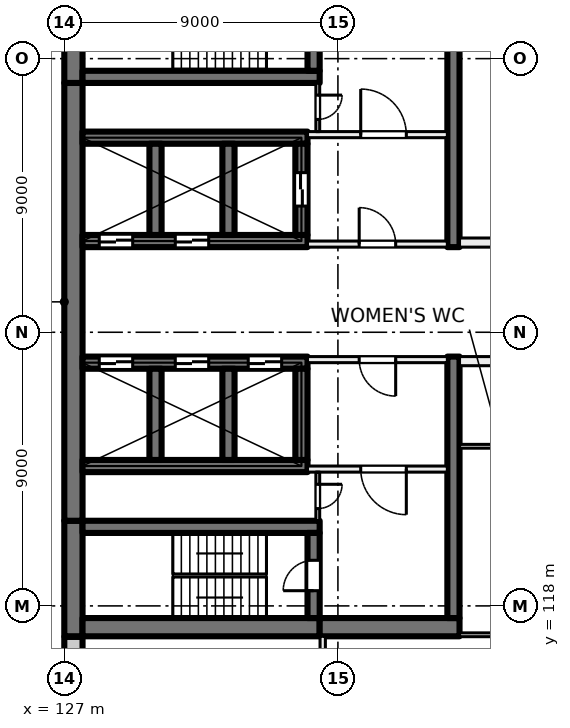
"""IFC4 building model, lengths in metres.
Left out: names, types, materials, properties, quantities, classifications, styles, units other than length and angle.
Written with IfcOpenShell. Run it as: python <this file> out.ifc"""

import sys

from ifc_helpers import new_model, si_unit, direction, frame, frame_2d, origin, place, context, subcontext, project, spatial, rectangle, extrude, element, fill, save


model = new_model("IFC4")
c1 = context("Model", 3, precision=1e-05, world=origin(), true_north=direction((0.0, 1.0)))
c2 = subcontext(c1, "Body", "Model", "MODEL_VIEW")
j1 = project(units=[si_unit("LENGTHUNIT", "METRE"), si_unit("PLANEANGLEUNIT", "RADIAN")], contexts=[c1])
p1 = place(None, origin())
s1 = spatial("IfcSite", under=j1, at=p1, CompositionType="ELEMENT")
p2 = place(p1, origin())
s2 = spatial("IfcBuilding", under=s1, at=p2, CompositionType="ELEMENT")
p3 = place(p2, frame((0.0, 0.0, 43.5)))
s3 = spatial("IfcBuildingStorey", under=s2, at=p3, CompositionType="ELEMENT", Elevation=43.5)
p4 = place(p3, frame((127.3, 117.0, 0.0), z_axis=(0.0, 0.0, 1.0), x_axis=(0.0, 1.0, 0.0)))
e1 = element("IfcWall", 1, at=p4, inside=s3, PredefinedType="SHEAR", context=c2, shape_type="SweptSolid", body=[
    extrude(rectangle(XDim=3.8, YDim=0.6, at=frame_2d((1.9, 0.0))), origin(), (0.0, 0.0, 1.0), 4.0),
])
p5 = place(p3, frame((127.3, 120.8, 0.0), z_axis=(0.0, 0.0, 1.0), x_axis=(0.0, 1.0, 0.0)))
e2 = element("IfcWall", 2, at=p5, inside=s3, PredefinedType="SHEAR", context=c2, shape_type="SweptSolid", body=[
    extrude(rectangle(XDim=14.4, YDim=0.6, at=frame_2d((7.2, 0.0))), origin(), (0.0, 0.0, 1.0), 4.0),
])
p6 = place(p3, frame((127.3, 135.2, 0.0), z_axis=(0.0, 0.0, 1.0), x_axis=(0.0, 1.0, 0.0)))
e3 = element("IfcWall", 3, at=p6, inside=s3, PredefinedType="SHEAR", context=c2, shape_type="SweptSolid", body=[
    extrude(rectangle(XDim=3.8, YDim=0.6, at=frame_2d((1.9, 0.0))), origin(), (0.0, 0.0, 1.0), 4.0),
])
p7 = place(p3, frame((127.6, 117.3, 0.0), z_axis=(0.0, 0.0, 1.0), x_axis=(1.0, 0.0, 0.0)))
e4 = element("IfcWall", 4, at=p7, inside=s3, PredefinedType="SHEAR", context=c2, shape_type="SweptSolid", body=[
    extrude(rectangle(XDim=7.8, YDim=0.6, at=frame_2d((3.9, 0.0))), origin(), (0.0, 0.0, 1.0), 4.0),
])
p8 = place(p3, frame((135.4, 117.3, 0.0), z_axis=(0.0, 0.0, 1.0), x_axis=(1.0, 0.0, 0.0)))
e5 = element("IfcWall", 5, at=p8, inside=s3, PredefinedType="SHEAR", context=c2, shape_type="SweptSolid", body=[
    extrude(rectangle(XDim=4.6, YDim=0.6, at=frame_2d((2.3, 0.0))), origin(), (0.0, 0.0, 1.0), 4.0),
])
p9 = place(p3, frame((127.6, 120.6, 0.0), z_axis=(0.0, 0.0, 1.0), x_axis=(1.0, 0.0, 0.0)))
e6 = element("IfcWall", 6, at=p9, inside=s3, PredefinedType="SHEAR", context=c2, shape_type="SweptSolid", body=[
    extrude(rectangle(XDim=7.8, YDim=0.4, at=frame_2d((3.9, 0.0))), origin(), (0.0, 0.0, 1.0), 4.0),
])
p10 = place(p3, frame((135.2, 117.6, 0.0), z_axis=(0.0, 0.0, 1.0), x_axis=(0.0, 1.0, 0.0)))
e7 = element("IfcWall", 7, at=p10, inside=s3, PredefinedType="SHEAR", context=c2, shape_type="SweptSolid", body=[
    extrude(rectangle(XDim=2.8, YDim=0.4, at=frame_2d((1.4, 0.0))), origin(), (0.0, 0.0, 1.0), 4.0),
])
p11 = place(p10, frame((0.9, 0.0, 0.0)))
e8 = element("IfcOpeningElement", 8, at=p11, cuts=e7, PredefinedType="OPENING", context=c2, shape_type="SweptSolid", body=[
    extrude(rectangle(XDim=1.0, YDim=2.1, at=frame_2d((0.5, 1.05))), frame((0.0, 0.21, 0.0), z_axis=(0.0, -1.0, 0.0), x_axis=(1.0, 0.0, 0.0)), (0.0, 0.0, 1.0), 0.42),
])
p12 = place(p3, frame((127.6, 135.4, 0.0), z_axis=(0.0, 0.0, 1.0), x_axis=(1.0, 0.0, 0.0)))
e9 = element("IfcWall", 9, at=p12, inside=s3, PredefinedType="SHEAR", context=c2, shape_type="SweptSolid", body=[
    extrude(rectangle(XDim=7.8, YDim=0.4, at=frame_2d((3.9, 0.0))), origin(), (0.0, 0.0, 1.0), 4.0),
])
p13 = place(p3, frame((135.2, 135.6, 0.0), z_axis=(0.0, 0.0, 1.0), x_axis=(0.0, 1.0, 0.0)))
e10 = element("IfcWall", 10, at=p13, inside=s3, PredefinedType="SHEAR", context=c2, shape_type="SweptSolid", body=[
    extrude(rectangle(XDim=2.8, YDim=0.4, at=frame_2d((1.4, 0.0))), origin(), (0.0, 0.0, 1.0), 4.0),
])
p14 = place(p13, frame((0.9, 0.0, 0.0)))
e11 = element("IfcOpeningElement", 11, at=p14, cuts=e10, PredefinedType="OPENING", context=c2, shape_type="SweptSolid", body=[
    extrude(rectangle(XDim=1.0, YDim=2.1, at=frame_2d((0.5, 1.05))), frame((0.0, 0.21, 0.0), z_axis=(0.0, -1.0, 0.0), x_axis=(1.0, 0.0, 0.0)), (0.0, 0.0, 1.0), 0.42),
])
p15 = place(p3, frame((127.6, 126.0, 0.0), z_axis=(0.0, 0.0, 1.0), x_axis=(1.0, 0.0, 0.0)))
e12 = element("IfcWall", 12, at=p15, inside=s3, PredefinedType="SHEAR", context=c2, shape_type="SweptSolid", body=[
    extrude(rectangle(XDim=7.4, YDim=0.4, at=frame_2d((3.7, 0.0))), origin(), (0.0, 0.0, 1.0), 4.0),
])
p16 = place(p15, frame((0.55, 0.0, 0.0)))
e13 = element("IfcOpeningElement", 13, at=p16, cuts=e12, PredefinedType="OPENING", context=c2, shape_type="SweptSolid", body=[
    extrude(rectangle(XDim=1.1, YDim=2.1, at=frame_2d((0.55, 1.05))), frame((0.0, 0.21, 0.0), z_axis=(0.0, -1.0, 0.0), x_axis=(1.0, 0.0, 0.0)), (0.0, 0.0, 1.0), 0.42),
])
p17 = place(p15, frame((3.05, 0.0, 0.0)))
e14 = element("IfcOpeningElement", 14, at=p17, cuts=e12, PredefinedType="OPENING", context=c2, shape_type="SweptSolid", body=[
    extrude(rectangle(XDim=1.1, YDim=2.1, at=frame_2d((0.55, 1.05))), frame((0.0, 0.21, 0.0), z_axis=(0.0, -1.0, 0.0), x_axis=(1.0, 0.0, 0.0)), (0.0, 0.0, 1.0), 0.42),
])
p18 = place(p15, frame((5.45, 0.0, 0.0)))
e15 = element("IfcOpeningElement", 15, at=p18, cuts=e12, PredefinedType="OPENING", context=c2, shape_type="SweptSolid", body=[
    extrude(rectangle(XDim=1.1, YDim=2.1, at=frame_2d((0.55, 1.05))), frame((0.0, 0.21, 0.0), z_axis=(0.0, -1.0, 0.0), x_axis=(1.0, 0.0, 0.0)), (0.0, 0.0, 1.0), 0.42),
])
p19 = place(p3, frame((127.6, 122.6, 0.0), z_axis=(0.0, 0.0, 1.0), x_axis=(1.0, 0.0, 0.0)))
e16 = element("IfcWall", 16, at=p19, inside=s3, PredefinedType="SHEAR", context=c2, shape_type="SweptSolid", body=[
    extrude(rectangle(XDim=7.4, YDim=0.4, at=frame_2d((3.7, 0.0))), origin(), (0.0, 0.0, 1.0), 4.0),
])
for number, where, z_axis, x_axis in (
    (17, (130.0, 122.8, 0.0), (0.0, 0.0, 1.0), (0.0, 1.0, 0.0)),
    (18, (132.4, 122.8, 0.0), (0.0, 0.0, 1.0), (0.0, 1.0, 0.0)),
    (19, (134.8, 122.8, 0.0), (0.0, 0.0, 1.0), (0.0, 1.0, 0.0)),
):
    element("IfcWall", number, at=place(p3, frame(where, z_axis=z_axis, x_axis=x_axis)), inside=s3, PredefinedType="SHEAR", context=c2, shape_type="SweptSolid", body=[
        extrude(rectangle(XDim=3.0, YDim=0.4, at=frame_2d((1.5, 0.0))), origin(), (0.0, 0.0, 1.0), 4.0),
    ])
p20 = place(p3, frame((127.6, 130.0, 0.0), z_axis=(0.0, 0.0, 1.0), x_axis=(1.0, 0.0, 0.0)))
e20 = element("IfcWall", 20, at=p20, inside=s3, PredefinedType="SHEAR", context=c2, shape_type="SweptSolid", body=[
    extrude(rectangle(XDim=7.4, YDim=0.4, at=frame_2d((3.7, 0.0))), origin(), (0.0, 0.0, 1.0), 4.0),
])
p21 = place(p20, frame((0.55, 0.0, 0.0)))
e21 = element("IfcOpeningElement", 21, at=p21, cuts=e20, PredefinedType="OPENING", context=c2, shape_type="SweptSolid", body=[
    extrude(rectangle(XDim=1.1, YDim=2.1, at=frame_2d((0.55, 1.05))), frame((0.0, 0.21, 0.0), z_axis=(0.0, -1.0, 0.0), x_axis=(1.0, 0.0, 0.0)), (0.0, 0.0, 1.0), 0.42),
])
p22 = place(p20, frame((3.05, 0.0, 0.0)))
e22 = element("IfcOpeningElement", 22, at=p22, cuts=e20, PredefinedType="OPENING", context=c2, shape_type="SweptSolid", body=[
    extrude(rectangle(XDim=1.1, YDim=2.1, at=frame_2d((0.55, 1.05))), frame((0.0, 0.21, 0.0), z_axis=(0.0, -1.0, 0.0), x_axis=(1.0, 0.0, 0.0)), (0.0, 0.0, 1.0), 0.42),
])
p23 = place(p3, frame((127.6, 133.4, 0.0), z_axis=(0.0, 0.0, 1.0), x_axis=(1.0, 0.0, 0.0)))
e23 = element("IfcWall", 23, at=p23, inside=s3, PredefinedType="SHEAR", context=c2, shape_type="SweptSolid", body=[
    extrude(rectangle(XDim=7.4, YDim=0.4, at=frame_2d((3.7, 0.0))), origin(), (0.0, 0.0, 1.0), 4.0),
])
for number, where, z_axis, x_axis in (
    (24, (130.0, 130.2, 0.0), (0.0, 0.0, 1.0), (0.0, 1.0, 0.0)),
    (25, (132.4, 130.2, 0.0), (0.0, 0.0, 1.0), (0.0, 1.0, 0.0)),
):
    element("IfcWall", number, at=place(p3, frame(where, z_axis=z_axis, x_axis=x_axis)), inside=s3, PredefinedType="SHEAR", context=c2, shape_type="SweptSolid", body=[
        extrude(rectangle(XDim=3.0, YDim=0.4, at=frame_2d((1.5, 0.0))), origin(), (0.0, 0.0, 1.0), 4.0),
    ])
p24 = place(p3, frame((134.8, 130.2, 0.0), z_axis=(0.0, 0.0, 1.0), x_axis=(0.0, 1.0, 0.0)))
e26 = element("IfcWall", 26, at=p24, inside=s3, PredefinedType="SHEAR", context=c2, shape_type="SweptSolid", body=[
    extrude(rectangle(XDim=3.0, YDim=0.4, at=frame_2d((1.5, 0.0))), origin(), (0.0, 0.0, 1.0), 4.0),
])
p25 = place(p24, frame((0.95, 0.0, 0.0)))
e27 = element("IfcOpeningElement", 27, at=p25, cuts=e26, PredefinedType="OPENING", context=c2, shape_type="SweptSolid", body=[
    extrude(rectangle(XDim=1.1, YDim=2.1, at=frame_2d((0.55, 1.05))), frame((0.0, 0.21, 0.0), z_axis=(0.0, -1.0, 0.0), x_axis=(1.0, 0.0, 0.0)), (0.0, 0.0, 1.0), 0.42),
])
for number, where, z_axis, x_axis in (
    (28, (139.8, 117.6, 0.0), (0.0, 0.0, 1.0), (0.0, 1.0, 0.0)),
    (29, (139.8, 129.8, 0.0), (0.0, 0.0, 1.0), (0.0, 1.0, 0.0)),
):
    element("IfcWall", number, at=place(p3, frame(where, z_axis=z_axis, x_axis=x_axis)), inside=s3, PredefinedType="SHEAR", context=c2, shape_type="SweptSolid", body=[
        extrude(rectangle(XDim=8.6, YDim=0.4, at=frame_2d((4.3, 0.0))), origin(), (0.0, 0.0, 1.0), 4.0),
    ])
p26 = place(p3, frame((127.3, 114.07, 0.0), z_axis=(0.0, 0.0, 1.0), x_axis=(0.0, 1.0, 0.0)))
e30 = element("IfcWall", 30, at=p26, inside=s3, PredefinedType="SOLIDWALL", context=c2, shape_type="SweptSolid", body=[
    extrude(rectangle(XDim=2.91, YDim=0.6, at=frame_2d((1.455, 0.0))), origin(), (0.0, 0.0, 1.0), 3.625),
])
p27 = place(p3, frame((135.0, 129.9, 0.0), z_axis=(0.0, 0.0, 1.0), x_axis=(1.0, 0.0, 0.0)))
e31 = element("IfcWall", 31, at=p27, inside=s3, PredefinedType="PARTITIONING", context=c2, shape_type="SweptSolid", body=[
    extrude(rectangle(XDim=4.6, YDim=0.2, at=frame_2d((2.3, 0.0))), origin(), (0.0, 0.0, 1.0), 3.625),
])
p28 = place(p27, frame((1.7, 0.0, 0.0)))
e32 = element("IfcOpeningElement", 32, at=p28, cuts=e31, PredefinedType="OPENING", context=c2, shape_type="SweptSolid", body=[
    extrude(rectangle(XDim=1.2, YDim=2.1, at=frame_2d((0.6, 1.05))), frame((0.0, 0.11, 0.0), z_axis=(0.0, -1.0, 0.0), x_axis=(1.0, 0.0, 0.0)), (0.0, 0.0, 1.0), 0.22),
])
p29 = place(p3, frame((135.0, 133.5, 0.0), z_axis=(0.0, 0.0, 1.0), x_axis=(1.0, 0.0, 0.0)))
e33 = element("IfcWall", 33, at=p29, inside=s3, PredefinedType="PARTITIONING", context=c2, shape_type="SweptSolid", body=[
    extrude(rectangle(XDim=4.6, YDim=0.2, at=frame_2d((2.3, 0.0))), origin(), (0.0, 0.0, 1.0), 3.625),
])
p30 = place(p29, frame((1.75, 0.0, 0.0)))
e34 = element("IfcOpeningElement", 34, at=p30, cuts=e33, PredefinedType="OPENING", context=c2, shape_type="SweptSolid", body=[
    extrude(rectangle(XDim=1.5, YDim=2.1, at=frame_2d((0.75, 1.05))), frame((0.0, 0.11, 0.0), z_axis=(0.0, -1.0, 0.0), x_axis=(1.0, 0.0, 0.0)), (0.0, 0.0, 1.0), 0.22),
])
p31 = place(p3, frame((135.337, 135.2, 0.0), z_axis=(0.0, 0.0, 1.0), x_axis=(0.0, -1.0, 0.0)))
e35 = element("IfcWall", 35, at=p31, inside=s3, PredefinedType="PARTITIONING", context=c2, shape_type="SweptSolid", body=[
    extrude(rectangle(XDim=1.6, YDim=0.125, at=frame_2d((0.8, 0.0))), origin(), (0.0, 0.0, 1.0), 3.625),
])
p32 = place(p31, frame((0.4, 0.0, 0.0)))
e36 = element("IfcOpeningElement", 36, at=p32, cuts=e35, PredefinedType="OPENING", context=c2, shape_type="SweptSolid", body=[
    extrude(rectangle(XDim=0.8, YDim=2.1, at=frame_2d((0.4, 1.05))), frame((0.0, 0.073, 0.0), z_axis=(0.0, -1.0, 0.0), x_axis=(1.0, 0.0, 0.0)), (0.0, 0.0, 1.0), 0.145),
])
p33 = place(p3, frame((139.6, 126.1, 0.0), z_axis=(0.0, 0.0, 1.0), x_axis=(-1.0, 0.0, 0.0)))
e37 = element("IfcWall", 37, at=p33, inside=s3, PredefinedType="PARTITIONING", context=c2, shape_type="SweptSolid", body=[
    extrude(rectangle(XDim=4.6, YDim=0.2, at=frame_2d((2.3, 0.0))), origin(), (0.0, 0.0, 1.0), 3.625),
])
p34 = place(p33, frame((1.7, 0.0, 0.0)))
e38 = element("IfcOpeningElement", 38, at=p34, cuts=e37, PredefinedType="OPENING", context=c2, shape_type="SweptSolid", body=[
    extrude(rectangle(XDim=1.2, YDim=2.1, at=frame_2d((0.6, 1.05))), frame((0.0, 0.11, 0.0), z_axis=(0.0, -1.0, 0.0), x_axis=(1.0, 0.0, 0.0)), (0.0, 0.0, 1.0), 0.22),
])
p35 = place(p3, frame((139.6, 122.5, 0.0), z_axis=(0.0, 0.0, 1.0), x_axis=(-1.0, 0.0, 0.0)))
e39 = element("IfcWall", 39, at=p35, inside=s3, PredefinedType="PARTITIONING", context=c2, shape_type="SweptSolid", body=[
    extrude(rectangle(XDim=4.6, YDim=0.2, at=frame_2d((2.3, 0.0))), origin(), (0.0, 0.0, 1.0), 3.625),
])
p36 = place(p35, frame((1.35, 0.0, 0.0)))
e40 = element("IfcOpeningElement", 40, at=p36, cuts=e39, PredefinedType="OPENING", context=c2, shape_type="SweptSolid", body=[
    extrude(rectangle(XDim=1.5, YDim=2.1, at=frame_2d((0.75, 1.05))), frame((0.0, 0.11, 0.0), z_axis=(0.0, -1.0, 0.0), x_axis=(1.0, 0.0, 0.0)), (0.0, 0.0, 1.0), 0.22),
])
p37 = place(p3, frame((135.337, 122.4, 0.0), z_axis=(0.0, 0.0, 1.0), x_axis=(0.0, -1.0, 0.0)))
e41 = element("IfcWall", 41, at=p37, inside=s3, PredefinedType="PARTITIONING", context=c2, shape_type="SweptSolid", body=[
    extrude(rectangle(XDim=1.6, YDim=0.125, at=frame_2d((0.8, 0.0))), origin(), (0.0, 0.0, 1.0), 3.625),
])
p38 = place(p37, frame((0.4, 0.0, 0.0)))
e42 = element("IfcOpeningElement", 42, at=p38, cuts=e41, PredefinedType="OPENING", context=c2, shape_type="SweptSolid", body=[
    extrude(rectangle(XDim=0.8, YDim=2.1, at=frame_2d((0.4, 1.05))), frame((0.0, 0.073, 0.0), z_axis=(0.0, -1.0, 0.0), x_axis=(1.0, 0.0, 0.0)), (0.0, 0.0, 1.0), 0.145),
])
p39 = place(p3, frame((135.5, 117.0, 0.0), z_axis=(0.0, 0.0, 1.0), x_axis=(0.0, -1.0, 0.0)))
e43 = element("IfcWall", 43, at=p39, inside=s3, PredefinedType="PARTITIONING", context=c2, shape_type="SweptSolid", body=[
    extrude(rectangle(XDim=6.4, YDim=0.175, at=frame_2d((3.2, 0.0))), origin(), (0.0, 0.0, 1.0), 3.625),
])
p40 = place(p39, frame((2.6, 0.0, 0.0)))
e44 = element("IfcOpeningElement", 44, at=p40, cuts=e43, PredefinedType="OPENING", context=c2, shape_type="SweptSolid", body=[
    extrude(rectangle(XDim=1.2, YDim=2.1, at=frame_2d((0.6, 1.05))), frame((0.0, 0.097, 0.0), z_axis=(0.0, -1.0, 0.0), x_axis=(1.0, 0.0, 0.0)), (0.0, 0.0, 1.0), 0.195),
])
p41 = place(p3, frame((140.0, 117.05, 0.0), z_axis=(0.0, 0.0, 1.0), x_axis=(1.0, 0.0, 0.0)))
e45 = element("IfcWall", 45, at=p41, inside=s3, PredefinedType="PARTITIONING", context=c2, shape_type="SweptSolid", body=[
    extrude(rectangle(XDim=8.938, YDim=0.125, at=frame_2d((4.469, 0.0))), origin(), (0.0, 0.0, 1.0), 3.625),
])
p42 = place(p3, frame((148.938, 123.25, 0.0), z_axis=(0.0, 0.0, 1.0), x_axis=(-1.0, 0.0, 0.0)))
e46 = element("IfcWall", 46, at=p42, inside=s3, PredefinedType="PARTITIONING", context=c2, shape_type="SweptSolid", body=[
    extrude(rectangle(XDim=8.938, YDim=0.125, at=frame_2d((4.469, 0.0))), origin(), (0.0, 0.0, 1.0), 3.625),
])
p43 = place(p42, frame((6.288, 0.0, 0.0)))
e47 = element("IfcOpeningElement", 47, at=p43, cuts=e46, PredefinedType="OPENING", context=c2, shape_type="SweptSolid", body=[
    extrude(rectangle(XDim=0.8, YDim=2.1, at=frame_2d((0.4, 1.05))), frame((0.0, 0.073, 0.0), z_axis=(0.0, -1.0, 0.0), x_axis=(1.0, 0.0, 0.0)), (0.0, 0.0, 1.0), 0.145),
])
p44 = place(p42, frame((3.037, 0.0, 0.0)))
e48 = element("IfcOpeningElement", 48, at=p44, cuts=e46, PredefinedType="OPENING", context=c2, shape_type="SweptSolid", body=[
    extrude(rectangle(XDim=0.8, YDim=2.1, at=frame_2d((0.4, 1.05))), frame((0.0, 0.073, 0.0), z_axis=(0.0, -1.0, 0.0), x_axis=(1.0, 0.0, 0.0)), (0.0, 0.0, 1.0), 0.145),
])
p45 = place(p3, frame((140.0, 129.95, 0.0), z_axis=(0.0, 0.0, 1.0), x_axis=(1.0, 0.0, 0.0)))
e49 = element("IfcWall", 49, at=p45, inside=s3, PredefinedType="PARTITIONING", context=c2, shape_type="SweptSolid", body=[
    extrude(rectangle(XDim=14.0, YDim=0.3, at=frame_2d((7.0, 0.0))), origin(), (0.0, 0.0, 1.0), 3.625),
])
p46 = place(p45, frame((6.1, 0.0, 0.0)))
e50 = element("IfcOpeningElement", 50, at=p46, cuts=e49, PredefinedType="OPENING", context=c2, shape_type="SweptSolid", body=[
    extrude(rectangle(XDim=1.8, YDim=2.1, at=frame_2d((0.9, 1.05))), frame((0.0, 0.16, 0.0), z_axis=(0.0, -1.0, 0.0), x_axis=(1.0, 0.0, 0.0)), (0.0, 0.0, 1.0), 0.32),
])
p47 = place(p3, frame((154.0, 126.05, 0.0), z_axis=(0.0, 0.0, 1.0), x_axis=(-1.0, 0.0, 0.0)))
e51 = element("IfcWall", 51, at=p47, inside=s3, PredefinedType="PARTITIONING", context=c2, shape_type="SweptSolid", body=[
    extrude(rectangle(XDim=14.0, YDim=0.3, at=frame_2d((7.0, 0.0))), origin(), (0.0, 0.0, 1.0), 3.625),
])
p48 = place(p47, frame((10.25, 0.0, 0.0)))
e52 = element("IfcOpeningElement", 52, at=p48, cuts=e51, PredefinedType="OPENING", context=c2, shape_type="SweptSolid", body=[
    extrude(rectangle(XDim=1.0, YDim=2.1, at=frame_2d((0.5, 1.05))), frame((0.0, 0.16, 0.0), z_axis=(0.0, -1.0, 0.0), x_axis=(1.0, 0.0, 0.0)), (0.0, 0.0, 1.0), 0.32),
])
p49 = place(p47, frame((1.6, 0.0, 0.0)))
e53 = element("IfcOpeningElement", 53, at=p49, cuts=e51, PredefinedType="OPENING", context=c2, shape_type="SweptSolid", body=[
    extrude(rectangle(XDim=1.8, YDim=2.1, at=frame_2d((0.9, 1.05))), frame((0.0, 0.16, 0.0), z_axis=(0.0, -1.0, 0.0), x_axis=(1.0, 0.0, 0.0)), (0.0, 0.0, 1.0), 0.32),
])
p50 = place(p21, origin())
e54 = element("IfcDoor", 54, at=p50, inside=s3, OperationType="DOUBLE_DOOR_SLIDING", PredefinedType="DOOR", context=c2, shape_type="SweptSolid", body=[
    extrude(rectangle(XDim=1.1, YDim=2.1, at=frame_2d((0.55, 1.05))), frame((0.0, 0.025, 0.0), z_axis=(0.0, -1.0, 0.0), x_axis=(1.0, 0.0, 0.0)), (0.0, 0.0, 1.0), 0.05),
])
fill(e21, e54)
p51 = place(p22, origin())
e55 = element("IfcDoor", 55, at=p51, inside=s3, OperationType="DOUBLE_DOOR_SLIDING", PredefinedType="DOOR", context=c2, shape_type="SweptSolid", body=[
    extrude(rectangle(XDim=1.1, YDim=2.1, at=frame_2d((0.55, 1.05))), frame((0.0, 0.025, 0.0), z_axis=(0.0, -1.0, 0.0), x_axis=(1.0, 0.0, 0.0)), (0.0, 0.0, 1.0), 0.05),
])
fill(e22, e55)
p52 = place(p16, origin())
e56 = element("IfcDoor", 56, at=p52, inside=s3, OperationType="DOUBLE_DOOR_SLIDING", PredefinedType="DOOR", context=c2, shape_type="SweptSolid", body=[
    extrude(rectangle(XDim=1.1, YDim=2.1, at=frame_2d((0.55, 1.05))), frame((0.0, 0.025, 0.0), z_axis=(0.0, -1.0, 0.0), x_axis=(1.0, 0.0, 0.0)), (0.0, 0.0, 1.0), 0.05),
])
fill(e13, e56)
p53 = place(p17, origin())
e57 = element("IfcDoor", 57, at=p53, inside=s3, OperationType="DOUBLE_DOOR_SLIDING", PredefinedType="DOOR", context=c2, shape_type="SweptSolid", body=[
    extrude(rectangle(XDim=1.1, YDim=2.1, at=frame_2d((0.55, 1.05))), frame((0.0, 0.025, 0.0), z_axis=(0.0, -1.0, 0.0), x_axis=(1.0, 0.0, 0.0)), (0.0, 0.0, 1.0), 0.05),
])
fill(e14, e57)
p54 = place(p18, origin())
e58 = element("IfcDoor", 58, at=p54, inside=s3, OperationType="DOUBLE_DOOR_SLIDING", PredefinedType="DOOR", context=c2, shape_type="SweptSolid", body=[
    extrude(rectangle(XDim=1.1, YDim=2.1, at=frame_2d((0.55, 1.05))), frame((0.0, 0.025, 0.0), z_axis=(0.0, -1.0, 0.0), x_axis=(1.0, 0.0, 0.0)), (0.0, 0.0, 1.0), 0.05),
])
fill(e15, e58)
p55 = place(p28, origin())
e59 = element("IfcDoor", 59, at=p55, inside=s3, OperationType="DOUBLE_DOOR_SINGLE_SWING", PredefinedType="DOOR", context=c2, shape_type="SweptSolid", body=[
    extrude(rectangle(XDim=1.2, YDim=2.1, at=frame_2d((0.6, 1.05))), frame((0.0, 0.025, 0.0), z_axis=(0.0, -1.0, 0.0), x_axis=(1.0, 0.0, 0.0)), (0.0, 0.0, 1.0), 0.05),
])
fill(e32, e59)
p56 = place(p30, origin())
e60 = element("IfcDoor", 60, at=p56, inside=s3, OperationType="DOUBLE_DOOR_SINGLE_SWING", PredefinedType="DOOR", context=c2, shape_type="SweptSolid", body=[
    extrude(rectangle(XDim=1.5, YDim=2.1, at=frame_2d((0.75, 1.05))), frame((0.0, 0.025, 0.0), z_axis=(0.0, -1.0, 0.0), x_axis=(1.0, 0.0, 0.0)), (0.0, 0.0, 1.0), 0.05),
])
fill(e34, e60)
p57 = place(p32, origin())
e61 = element("IfcDoor", 61, at=p57, inside=s3, OperationType="SINGLE_SWING_RIGHT", PredefinedType="DOOR", context=c2, shape_type="SweptSolid", body=[
    extrude(rectangle(XDim=0.8, YDim=2.1, at=frame_2d((0.4, 1.05))), frame((0.0, 0.025, 0.0), z_axis=(0.0, -1.0, 0.0), x_axis=(1.0, 0.0, 0.0)), (0.0, 0.0, 1.0), 0.05),
])
fill(e36, e61)
p58 = place(p34, origin())
e62 = element("IfcDoor", 62, at=p58, inside=s3, OperationType="DOUBLE_DOOR_SINGLE_SWING", PredefinedType="DOOR", context=c2, shape_type="SweptSolid", body=[
    extrude(rectangle(XDim=1.2, YDim=2.1, at=frame_2d((0.6, 1.05))), frame((0.0, 0.025, 0.0), z_axis=(0.0, -1.0, 0.0), x_axis=(1.0, 0.0, 0.0)), (0.0, 0.0, 1.0), 0.05),
])
fill(e38, e62)
p59 = place(p36, origin())
e63 = element("IfcDoor", 63, at=p59, inside=s3, OperationType="DOUBLE_DOOR_SINGLE_SWING", PredefinedType="DOOR", context=c2, shape_type="SweptSolid", body=[
    extrude(rectangle(XDim=1.5, YDim=2.1, at=frame_2d((0.75, 1.05))), frame((0.0, 0.025, 0.0), z_axis=(0.0, -1.0, 0.0), x_axis=(1.0, 0.0, 0.0)), (0.0, 0.0, 1.0), 0.05),
])
fill(e40, e63)
p60 = place(p11, origin())
e64 = element("IfcDoor", 64, at=p60, inside=s3, OperationType="SINGLE_SWING_RIGHT", PredefinedType="DOOR", context=c2, shape_type="SweptSolid", body=[
    extrude(rectangle(XDim=1.0, YDim=2.1, at=frame_2d((0.5, 1.05))), frame((0.0, 0.025, 0.0), z_axis=(0.0, -1.0, 0.0), x_axis=(1.0, 0.0, 0.0)), (0.0, 0.0, 1.0), 0.05),
])
fill(e8, e64)
p61 = place(p38, origin())
e65 = element("IfcDoor", 65, at=p61, inside=s3, OperationType="SINGLE_SWING_LEFT", PredefinedType="DOOR", context=c2, shape_type="SweptSolid", body=[
    extrude(rectangle(XDim=0.8, YDim=2.1, at=frame_2d((0.4, 1.05))), frame((0.0, 0.025, 0.0), z_axis=(0.0, -1.0, 0.0), x_axis=(1.0, 0.0, 0.0)), (0.0, 0.0, 1.0), 0.05),
])
fill(e42, e65)
p62 = place(p25, origin())
e66 = element("IfcDoor", 66, at=p62, inside=s3, OperationType="DOUBLE_DOOR_SLIDING", PredefinedType="DOOR", context=c2, shape_type="SweptSolid", body=[
    extrude(rectangle(XDim=1.1, YDim=2.1, at=frame_2d((0.55, 1.05))), frame((0.0, 0.025, 0.0), z_axis=(0.0, -1.0, 0.0), x_axis=(1.0, 0.0, 0.0)), (0.0, 0.0, 1.0), 0.05),
])
fill(e27, e66)
save(model, sys.argv[1])
